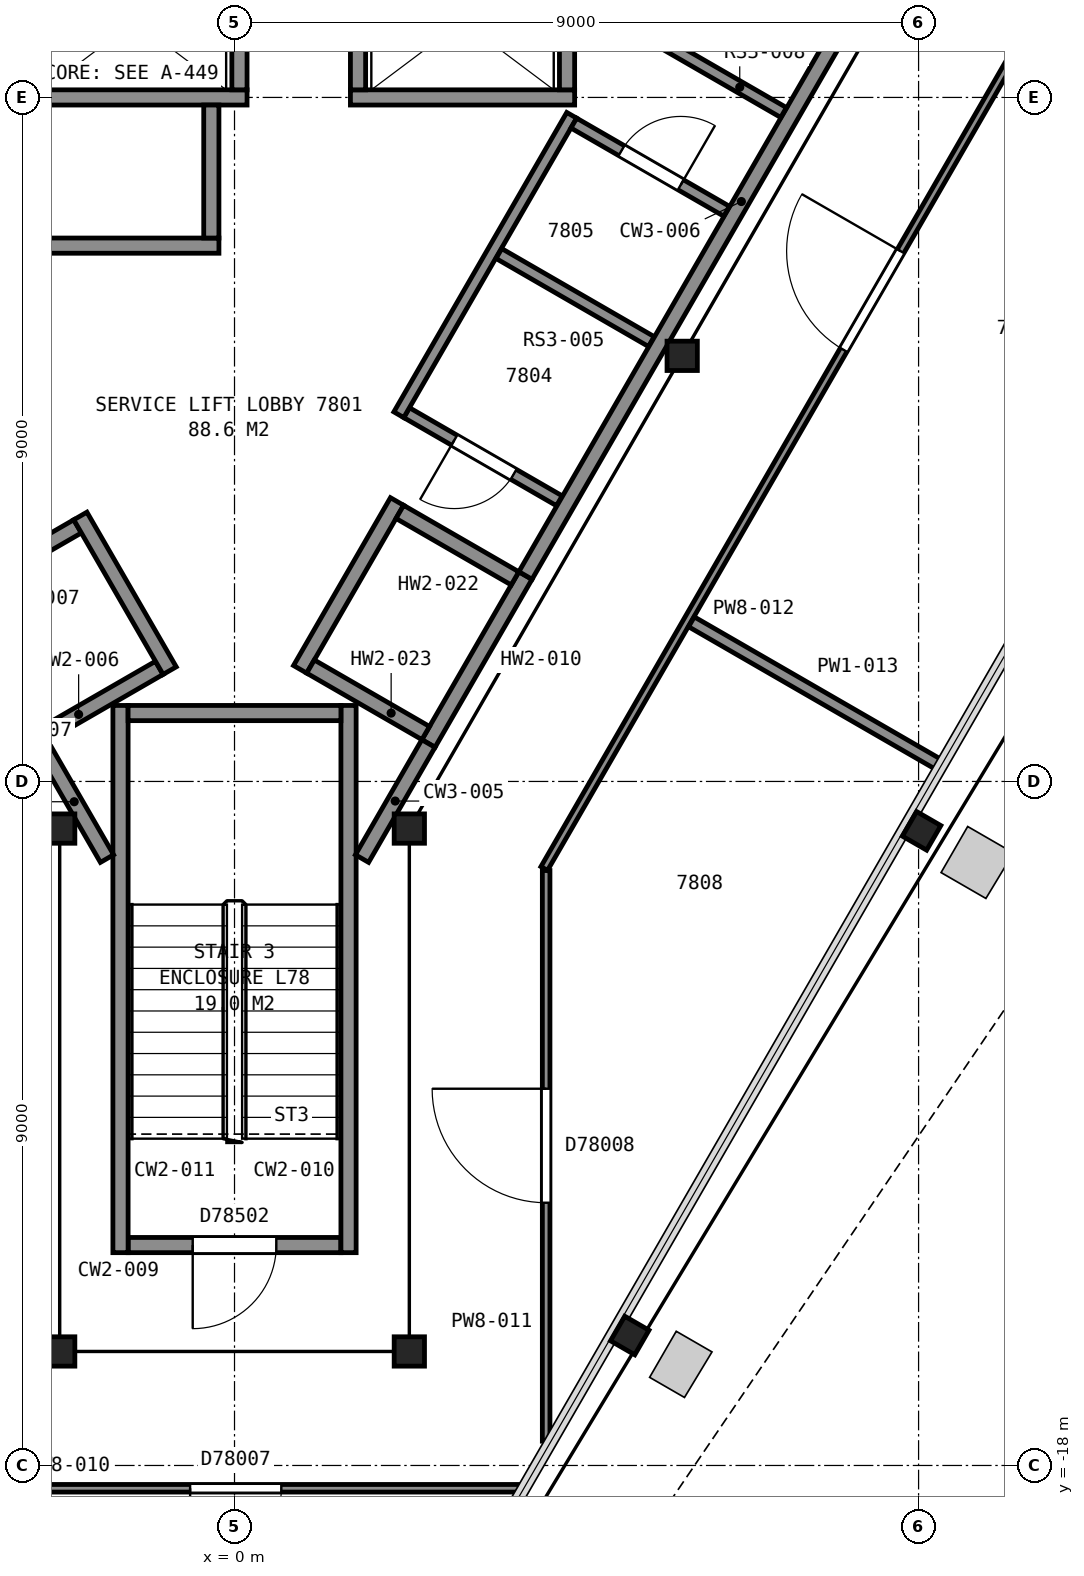
"""IFC4 building model, lengths in metres.
Left out: names, types, materials, properties, quantities, classifications, styles, units other than length and angle.
Written with IfcOpenShell. Run it as: python <this file> out.ifc"""

import sys

from ifc_helpers import new_model, si_unit, direction, frame, frame_2d, origin, origin_2d, place, context, subcontext, project, spatial, rectangle, i_section, extrude, element, fill, save


model = new_model("IFC4")
c1 = context("Model", 3, precision=1e-05, world=origin(), true_north=direction((0.0, 1.0)))
c2 = subcontext(c1, "Body", "Model", "MODEL_VIEW")
j1 = project(units=[si_unit("LENGTHUNIT", "METRE"), si_unit("PLANEANGLEUNIT", "RADIAN")], contexts=[c1])
p1 = place(None, origin())
s1 = spatial("IfcSite", under=j1, at=p1, CompositionType="ELEMENT")
p2 = place(p1, origin())
s2 = spatial("IfcBuilding", under=s1, at=p2, CompositionType="ELEMENT")
p3 = place(p2, frame((0.0, 0.0, 308.4)))
s3 = spatial("IfcBuildingStorey", under=s2, at=p3, CompositionType="ELEMENT", Elevation=308.4)
p4 = place(p3, frame((5.2, -16.29, 0.055), z_axis=(0.0, 0.0, 1.0), x_axis=(-0.5, -0.866025403784, 0.0)))
e1 = element("IfcColumn", 1, at=p4, inside=s3, PredefinedType="COLUMN", context=c2, shape_type="SweptSolid", body=[
    extrude(i_section(OverallWidth=0.373, OverallDepth=0.368, WebThickness=0.015, FlangeThickness=0.024, FilletRadius=0.015, at=origin_2d()), origin(), (0.0, 0.0, 1.0), 4.145),
])
p5 = place(p3, frame((9.04, -9.65, 0.045), z_axis=(0.0, 0.0, 1.0), x_axis=(-0.5, -0.866025403784, 0.0)))
e2 = element("IfcColumn", 2, at=p5, inside=s3, PredefinedType="COLUMN", context=c2, shape_type="SweptSolid", body=[
    extrude(i_section(OverallWidth=0.373, OverallDepth=0.368, WebThickness=0.015, FlangeThickness=0.024, FilletRadius=0.015, at=origin_2d()), origin(), (0.0, 0.0, 1.0), 4.155),
])
for number, where, z_axis, x_axis in (
    (3, (-2.3, -9.62, 0.0), (0.0, 0.0, 1.0), (1.0, 0.0, 0.0)),
    (4, (-2.3, -16.5, 0.0), (0.0, 0.0, 1.0), (-1.0, 0.0, 0.0)),
    (5, (2.3, -16.5, 0.0), (0.0, 0.0, 1.0), (-1.0, 0.0, 0.0)),
    (6, (2.3, -9.62, 0.0), (0.0, 0.0, 1.0), (1.0, 0.0, 0.0)),
    (7, (5.89, -3.4, 0.0), (0.0, 0.0, 1.0), (1.0, 0.0, 0.0)),
):
    element("IfcColumn", number, at=place(p3, frame(where, z_axis=z_axis, x_axis=x_axis)), inside=s3, PredefinedType="COLUMN", context=c2, shape_type="SweptSolid", body=[
        extrude(i_section(OverallWidth=0.399, OverallDepth=0.386, WebThickness=0.021, FlangeThickness=0.033, FilletRadius=0.015, at=origin_2d()), origin(), (0.0, 0.0, 1.0), 4.2),
    ])
p6 = place(p3, frame((-1.4, -15.1, 0.0), z_axis=(0.0, 0.0, 1.0), x_axis=(1.0, 0.0, 0.0)))
e8 = element("IfcWall", 8, at=p6, inside=s3, PredefinedType="PARTITIONING", context=c2, shape_type="SweptSolid", body=[
    extrude(rectangle(XDim=2.8, YDim=0.2, at=frame_2d((1.4, 0.0))), origin(), (0.0, 0.0, 1.0), 3.95),
])
p7 = place(p6, frame((0.85, 0.0, 0.0)))
e9 = element("IfcOpeningElement", 9, at=p7, cuts=e8, PredefinedType="OPENING", context=c2, shape_type="SweptSolid", body=[
    extrude(rectangle(XDim=1.1, YDim=2.1, at=frame_2d((0.55, 1.05))), frame((0.0, 0.11, 0.0), z_axis=(0.0, -1.0, 0.0), x_axis=(1.0, 0.0, 0.0)), (0.0, 0.0, 1.0), 0.22),
])
for number, where, z_axis, x_axis in (
    (10, (1.5, -8.0, 0.0), (0.0, 0.0, 1.0), (0.0, -1.0, 0.0)),
    (11, (-1.5, -8.0, 0.0), (0.0, 0.0, 1.0), (0.0, -1.0, 0.0)),
):
    element("IfcWall", number, at=place(p3, frame(where, z_axis=z_axis, x_axis=x_axis)), inside=s3, PredefinedType="PARTITIONING", context=c2, shape_type="SweptSolid", body=[
        extrude(rectangle(XDim=7.2, YDim=0.2, at=frame_2d((3.6, 0.0))), origin(), (0.0, 0.0, 1.0), 3.95),
    ])
p8 = place(p3, frame((-1.4, -8.1, 0.0), z_axis=(0.0, 0.0, 1.0), x_axis=(1.0, 0.0, 0.0)))
e12 = element("IfcWall", 12, at=p8, inside=s3, PredefinedType="PARTITIONING", context=c2, shape_type="SweptSolid", body=[
    extrude(rectangle(XDim=2.8, YDim=0.2, at=frame_2d((1.4, 0.0))), origin(), (0.0, 0.0, 1.0), 3.95),
])
p9 = place(p3, frame((-2.755, -1.95, 0.0), z_axis=(0.0, 0.0, 1.0), x_axis=(1.0, 0.0, 0.0)))
e13 = element("IfcWall", 13, at=p9, inside=s3, PredefinedType="PARTITIONING", context=c2, shape_type="SweptSolid", body=[
    extrude(rectangle(XDim=2.55, YDim=0.2, at=frame_2d((1.275, 0.0))), origin(), (0.0, 0.0, 1.0), 3.95),
])
p10 = place(p3, frame((-2.785, 0.0, 0.0), z_axis=(0.0, 0.0, 1.0), x_axis=(1.0, 0.0, 0.0)))
e14 = element("IfcWall", 14, at=p10, inside=s3, PredefinedType="PARTITIONING", context=c2, shape_type="SweptSolid", body=[
    extrude(rectangle(XDim=2.95, YDim=0.2, at=frame_2d((1.475, 0.0))), origin(), (0.0, 0.0, 1.0), 4.2),
])
p11 = place(p3, frame((1.525, 0.0, 0.0), z_axis=(0.0, 0.0, 1.0), x_axis=(1.0, 0.0, 0.0)))
e15 = element("IfcWall", 15, at=p11, inside=s3, PredefinedType="PARTITIONING", context=c2, shape_type="SweptSolid", body=[
    extrude(rectangle(XDim=2.95, YDim=0.2, at=frame_2d((1.475, 0.0))), origin(), (0.0, 0.0, 1.0), 4.2),
])
for number, where, z_axis, x_axis in (
    (16, (-2.505, -8.38, 0.0), (0.0, 0.0, 1.0), (0.866, 0.5, 0.0)),
    (17, (-3.58, -6.519, 0.0), (0.0, 0.0, 1.0), (0.866, 0.5, 0.0)),
):
    element("IfcWall", number, at=place(p3, frame(where, z_axis=z_axis, x_axis=x_axis)), inside=s3, PredefinedType="PARTITIONING", context=c2, shape_type="SweptSolid", body=[
        extrude(rectangle(XDim=1.75, YDim=0.2, at=frame_2d((0.875, 0.0))), origin(), (0.0, 0.0, 1.0), 3.95),
    ])
for number, where, z_axis, x_axis in (
    (18, (2.552, -8.5, 0.0), (0.0, 0.0, 1.0), (0.5, 0.866, 0.0)),
    (19, (0.863, -7.525, 0.0), (0.0, 0.0, 1.0), (0.5, 0.866, 0.0)),
):
    element("IfcWall", number, at=place(p3, frame(where, z_axis=z_axis, x_axis=x_axis)), inside=s3, PredefinedType="PARTITIONING", context=c2, shape_type="SweptSolid", body=[
        extrude(rectangle(XDim=2.55, YDim=0.2, at=frame_2d((1.275, 0.0))), origin(), (0.0, 0.0, 1.0), 3.95),
    ])
for number, where, z_axis, x_axis in (
    (20, (4.375, 0.1, 0.0), (0.0, 0.0, 1.0), (0.0, 1.0, 0.0)),
    (21, (1.625, 0.1, 0.0), (0.0, 0.0, 1.0), (0.0, 1.0, 0.0)),
    (22, (0.065, 0.1, 0.0), (0.0, 0.0, 1.0), (0.0, 1.0, 0.0)),
):
    element("IfcWall", number, at=place(p3, frame(where, z_axis=z_axis, x_axis=x_axis)), inside=s3, PredefinedType="PARTITIONING", context=c2, shape_type="SweptSolid", body=[
        extrude(rectangle(XDim=1.95, YDim=0.2, at=frame_2d((0.975, 0.0))), origin(), (0.0, 0.0, 1.0), 4.2),
    ])
p12 = place(p3, frame((-0.305, -1.85, 0.0), z_axis=(0.0, 0.0, 1.0), x_axis=(0.0, 1.0, 0.0)))
e23 = element("IfcWall", 23, at=p12, inside=s3, PredefinedType="PARTITIONING", context=c2, shape_type="SweptSolid", body=[
    extrude(rectangle(XDim=1.75, YDim=0.2, at=frame_2d((0.875, 0.0))), origin(), (0.0, 0.0, 1.0), 3.95),
])
p13 = place(p3, frame((-0.853, -7.542, 0.0), z_axis=(0.0, 0.0, 1.0), x_axis=(-0.500016218704, 0.866016039709, 0.0)))
e24 = element("IfcWall", 24, at=p13, inside=s3, PredefinedType="PARTITIONING", context=c2, shape_type="SweptSolid", body=[
    extrude(rectangle(XDim=2.35, YDim=0.2, at=frame_2d((1.175, 0.0))), origin(), (0.0, 0.0, 1.0), 3.95),
])
for number, where, z_axis, x_axis in (
    (25, (3.69, -6.328, 0.0), (0.0, 0.0, 1.0), (-0.866, 0.5, 0.0)),
    (26, (2.515, -8.363, 0.0), (0.0, 0.0, 1.0), (-0.866, 0.5, 0.0)),
):
    element("IfcWall", number, at=place(p3, frame(where, z_axis=z_axis, x_axis=x_axis)), inside=s3, PredefinedType="PARTITIONING", context=c2, shape_type="SweptSolid", body=[
        extrude(rectangle(XDim=1.75, YDim=0.2, at=frame_2d((0.875, 0.0))), origin(), (0.0, 0.0, 1.0), 3.95),
    ])
p14 = place(p3, frame((-2.541, -8.519, 0.0), z_axis=(0.0, 0.0, 1.0), x_axis=(0.500016142392, -0.86601608377, 0.0)))
e27 = element("IfcWall", 27, at=p14, inside=s3, PredefinedType="PARTITIONING", context=c2, shape_type="SweptSolid", body=[
    extrude(rectangle(XDim=1.727, YDim=0.2, at=frame_2d((0.864, 0.0))), origin(), (0.0, 0.0, 1.0), 3.95),
])
p15 = place(p3, frame((1.677, -10.015, 0.0), z_axis=(0.0, 0.0, 1.0), x_axis=(0.49983532306, 0.866120459187, 0.0)))
e28 = element("IfcWall", 28, at=p15, inside=s3, PredefinedType="PARTITIONING", context=c2, shape_type="SweptSolid", body=[
    extrude(rectangle(XDim=1.748, YDim=0.2, at=frame_2d((0.874, 0.0))), origin(), (0.0, 0.0, 1.0), 3.95),
])
p16 = place(p3, frame((2.264, -4.147, 0.0), z_axis=(0.0, 0.0, 1.0), x_axis=(0.866112027296, -0.499849933654, 0.0)))
e29 = element("IfcWall", 29, at=p16, inside=s3, PredefinedType="PARTITIONING", context=c2, shape_type="SweptSolid", body=[
    extrude(rectangle(XDim=2.321, YDim=0.15, at=frame_2d((1.161, 0.0))), origin(), (0.0, 0.0, 1.0), 3.95),
])
p17 = place(p16, frame((0.725, 0.0, 0.0)))
e30 = element("IfcOpeningElement", 30, at=p17, cuts=e29, PredefinedType="OPENING", context=c2, shape_type="SweptSolid", body=[
    extrude(rectangle(XDim=0.9, YDim=2.1, at=frame_2d((0.45, 1.05))), frame((0.0, 0.085, 0.0), z_axis=(0.0, -1.0, 0.0), x_axis=(1.0, 0.0, 0.0)), (0.0, 0.0, 1.0), 0.17),
])
p18 = place(p3, frame((2.161, -4.175, 0.0), z_axis=(0.0, 0.0, 1.0), x_axis=(0.500069275991, 0.865985403578, 0.0)))
e31 = element("IfcWall", 31, at=p18, inside=s3, PredefinedType="PARTITIONING", context=c2, shape_type="SweptSolid", body=[
    extrude(rectangle(XDim=4.55, YDim=0.15, at=frame_2d((2.275, 0.0))), origin(), (0.0, 0.0, 1.0), 3.95),
])
p19 = place(p3, frame((3.478, -2.054, 0.0), z_axis=(0.0, 0.0, 1.0), x_axis=(0.865957384972, -0.500117793536, 0.0)))
e32 = element("IfcWall", 32, at=p19, inside=s3, PredefinedType="PARTITIONING", context=c2, shape_type="SweptSolid", body=[
    extrude(rectangle(XDim=2.316, YDim=0.15, at=frame_2d((1.158, 0.0))), origin(), (0.0, 0.0, 1.0), 3.95),
])
p20 = place(p3, frame((3.828, -6.29, 0.0), z_axis=(0.0, 0.0, 1.0), x_axis=(0.499979739078, 0.866037101117, 0.0)))
e33 = element("IfcWall", 33, at=p20, inside=s3, PredefinedType="PARTITIONING", context=c2, shape_type="SweptSolid", body=[
    extrude(rectangle(XDim=11.363, YDim=0.2, at=frame_2d((5.681, 0.0))), origin(), (0.0, 0.0, 1.0), 3.95),
])
p21 = place(p3, frame((6.474, -1.498, 0.0), z_axis=(0.0, 0.0, 1.0), x_axis=(-0.866112027296, 0.499849933654, 0.0)))
e34 = element("IfcWall", 34, at=p21, inside=s3, PredefinedType="PARTITIONING", context=c2, shape_type="SweptSolid", body=[
    extrude(rectangle(XDim=2.321, YDim=0.15, at=frame_2d((1.161, 0.0))), origin(), (0.0, 0.0, 1.0), 3.95),
])
p22 = place(p21, frame((0.696, 0.0, 0.0)))
e35 = element("IfcOpeningElement", 35, at=p22, cuts=e34, PredefinedType="OPENING", context=c2, shape_type="SweptSolid", body=[
    extrude(rectangle(XDim=0.9, YDim=2.1, at=frame_2d((0.45, 1.05))), frame((0.0, 0.085, 0.0), z_axis=(0.0, -1.0, 0.0), x_axis=(1.0, 0.0, 0.0)), (0.0, 0.0, 1.0), 0.17),
])
p23 = place(p3, frame((5.301, 0.912, 0.0), z_axis=(0.0, 0.0, 1.0), x_axis=(0.866062920605, -0.499935013329, 0.0)))
e36 = element("IfcWall", 36, at=p23, inside=s3, PredefinedType="PARTITIONING", context=c2, shape_type="SweptSolid", body=[
    extrude(rectangle(XDim=2.22, YDim=0.15, at=frame_2d((1.11, 0.0))), origin(), (0.0, 0.0, 1.0), 3.95),
])
p24 = place(p3, frame((3.763, -18.3, 0.0), z_axis=(0.0, 0.0, 1.0), x_axis=(-1.0, 0.0, 0.0)))
e37 = element("IfcWall", 37, at=p24, inside=s3, PredefinedType="PARTITIONING", context=c2, shape_type="SweptSolid", body=[
    extrude(rectangle(XDim=7.526, YDim=0.1, at=frame_2d((3.763, 0.0))), origin(), (0.0, 0.0, 1.0), 3.297),
])
p25 = place(p24, frame((3.147, 0.0, 0.0)))
e38 = element("IfcOpeningElement", 38, at=p25, cuts=e37, PredefinedType="OPENING", context=c2, shape_type="SweptSolid", body=[
    extrude(rectangle(XDim=1.2, YDim=2.1, at=frame_2d((0.6, 1.05))), frame((0.0, 0.06, 0.0), z_axis=(0.0, -1.0, 0.0), x_axis=(1.0, 0.0, 0.0)), (0.0, 0.0, 1.0), 0.12),
])
p26 = place(p3, frame((4.1, -10.172, 0.0), z_axis=(0.0, 0.0, 1.0), x_axis=(0.0, -1.0, 0.0)))
e39 = element("IfcWall", 39, at=p26, inside=s3, PredefinedType="PARTITIONING", context=c2, shape_type="SweptSolid", body=[
    extrude(rectangle(XDim=7.508, YDim=0.1, at=frame_2d((3.754, 0.0))), origin(), (0.0, 0.0, 1.0), 3.297),
])
p27 = place(p26, frame((2.871, 0.0, 0.0)))
e40 = element("IfcOpeningElement", 40, at=p27, cuts=e39, PredefinedType="OPENING", context=c2, shape_type="SweptSolid", body=[
    extrude(rectangle(XDim=1.5, YDim=2.1, at=frame_2d((0.75, 1.05))), frame((0.0, 0.06, 0.0), z_axis=(0.0, -1.0, 0.0), x_axis=(1.0, 0.0, 0.0)), (0.0, 0.0, 1.0), 0.12),
])
p28 = place(p3, frame((10.823, 1.545, 0.0), z_axis=(0.0, 0.0, 1.0), x_axis=(-0.499912942625, -0.866075660549, 0.0)))
e41 = element("IfcWall", 41, at=p28, inside=s3, PredefinedType="PARTITIONING", context=c2, shape_type="SweptSolid", body=[
    extrude(rectangle(XDim=13.499, YDim=0.1, at=frame_2d((6.749, 0.0))), origin(), (0.0, 0.0, 1.0), 3.297),
])
p29 = place(p28, frame((4.119, 0.0, 0.0)))
e42 = element("IfcOpeningElement", 42, at=p29, cuts=e41, PredefinedType="OPENING", context=c2, shape_type="SweptSolid", body=[
    extrude(rectangle(XDim=1.5, YDim=2.1, at=frame_2d((0.75, 1.05))), frame((0.0, 0.06, 0.0), z_axis=(0.0, -1.0, 0.0), x_axis=(1.0, 0.0, 0.0)), (0.0, 0.0, 1.0), 0.12),
])
p30 = place(p3, frame((6.012, -6.899, 0.0), z_axis=(0.0, 0.0, 1.0), x_axis=(0.866034889475, -0.499983569942, 0.0)))
e43 = element("IfcWall", 43, at=p30, inside=s3, PredefinedType="PARTITIONING", context=c2, shape_type="SweptSolid", body=[
    extrude(rectangle(XDim=3.777, YDim=0.15, at=frame_2d((1.889, 0.0))), origin(), (0.0, 0.0, 1.0), 3.297),
])
p31 = place(p7, origin())
e44 = element("IfcDoor", 44, at=p31, inside=s3, OperationType="SINGLE_SWING_LEFT", PredefinedType="DOOR", context=c2, shape_type="SweptSolid", body=[
    extrude(rectangle(XDim=1.1, YDim=2.1, at=frame_2d((0.55, 1.05))), frame((0.0, 0.025, 0.0), z_axis=(0.0, -1.0, 0.0), x_axis=(1.0, 0.0, 0.0)), (0.0, 0.0, 1.0), 0.05),
])
fill(e9, e44)
p32 = place(p17, origin())
e45 = element("IfcDoor", 45, at=p32, inside=s3, OperationType="SINGLE_SWING_LEFT", PredefinedType="DOOR", context=c2, shape_type="SweptSolid", body=[
    extrude(rectangle(XDim=0.9, YDim=2.1, at=frame_2d((0.45, 1.05))), frame((0.0, 0.025, 0.0), z_axis=(0.0, -1.0, 0.0), x_axis=(1.0, 0.0, 0.0)), (0.0, 0.0, 1.0), 0.05),
])
fill(e30, e45)
p33 = place(p22, origin())
e46 = element("IfcDoor", 46, at=p33, inside=s3, OperationType="SINGLE_SWING_LEFT", PredefinedType="DOOR", context=c2, shape_type="SweptSolid", body=[
    extrude(rectangle(XDim=0.9, YDim=2.1, at=frame_2d((0.45, 1.05))), frame((0.0, 0.025, 0.0), z_axis=(0.0, -1.0, 0.0), x_axis=(1.0, 0.0, 0.0)), (0.0, 0.0, 1.0), 0.05),
])
fill(e35, e46)
p34 = place(p25, origin())
e47 = element("IfcDoor", 47, at=p34, inside=s3, OperationType="SINGLE_SWING_RIGHT", PredefinedType="DOOR", context=c2, shape_type="SweptSolid", body=[
    extrude(rectangle(XDim=1.2, YDim=2.1, at=frame_2d((0.6, 1.05))), frame((0.0, 0.025, 0.0), z_axis=(0.0, -1.0, 0.0), x_axis=(1.0, 0.0, 0.0)), (0.0, 0.0, 1.0), 0.05),
])
fill(e38, e47)
p35 = place(p27, origin())
e48 = element("IfcDoor", 48, at=p35, inside=s3, OperationType="DOUBLE_DOOR_SINGLE_SWING", PredefinedType="DOOR", context=c2, shape_type="SweptSolid", body=[
    extrude(rectangle(XDim=1.5, YDim=2.1, at=frame_2d((0.75, 1.05))), frame((0.0, 0.025, 0.0), z_axis=(0.0, -1.0, 0.0), x_axis=(1.0, 0.0, 0.0)), (0.0, 0.0, 1.0), 0.05),
])
fill(e40, e48)
p36 = place(p29, origin())
e49 = element("IfcDoor", 49, at=p36, inside=s3, OperationType="DOUBLE_DOOR_SINGLE_SWING", PredefinedType="DOOR", context=c2, shape_type="SweptSolid", body=[
    extrude(rectangle(XDim=1.5, YDim=2.1, at=frame_2d((0.75, 1.05))), frame((0.0, 0.025, 0.0), z_axis=(0.0, -1.0, 0.0), x_axis=(1.0, 0.0, 0.0)), (0.0, 0.0, 1.0), 0.05),
])
fill(e42, e49)
save(model, sys.argv[1])
